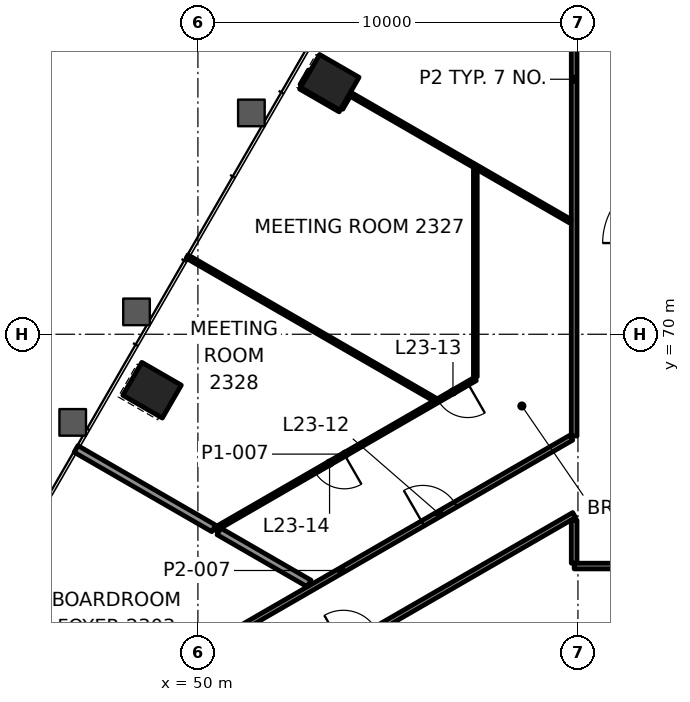
"""IFC4 building model, lengths in metres.
Left out: names, types, materials, properties, quantities, classifications, styles, units other than length and angle.
Written with IfcOpenShell. Run it as: python <this file> out.ifc"""

import sys

from ifc_helpers import new_model, si_unit, direction, frame, frame_2d, origin, origin_2d, place, context, subcontext, project, spatial, rectangle, extrude, element, fill, save


model = new_model("IFC4")
c1 = context("Model", 3, precision=1e-05, world=origin(), true_north=direction((0.0, 1.0)))
c2 = subcontext(c1, "Body", "Model", "MODEL_VIEW")
j1 = project(units=[si_unit("LENGTHUNIT", "METRE"), si_unit("PLANEANGLEUNIT", "RADIAN")], contexts=[c1])
p1 = place(None, origin())
s1 = spatial("IfcSite", under=j1, at=p1, CompositionType="ELEMENT")
p2 = place(p1, origin())
s2 = spatial("IfcBuilding", under=s1, at=p2, CompositionType="ELEMENT")
p3 = place(p2, frame((0.0, 0.0, 103.0)))
s3 = spatial("IfcBuildingStorey", under=s2, at=p3, CompositionType="ELEMENT", Elevation=103.0)
for number, where, z_axis, x_axis in (
    (1, (53.471, 76.628, -0.0), (0.0, 0.0, 1.0), (-0.5, -0.866, 0.0)),
    (2, (48.794, 68.528, -0.0), (0.0, 0.0, 1.0), (-0.5, -0.866, 0.0)),
):
    element("IfcColumn", number, at=place(p3, frame(where, z_axis=z_axis, x_axis=x_axis)), inside=s3, PredefinedType="COLUMN", context=c2, shape_type="SweptSolid", body=[
        extrude(rectangle(XDim=1.0, YDim=1.2, at=origin_2d()), origin(), (0.0, 0.0, 1.0), 4.2),
    ])
p4 = place(p3, frame((90.099, 63.9, 0.0), z_axis=(0.0, 0.0, 1.0), x_axis=(-1.0, 0.0, 0.0)))
e3 = element("IfcWall", 3, at=p4, inside=s3, PredefinedType="PARTITIONING", context=c2, shape_type="SweptSolid", body=[
    extrude(rectangle(XDim=30.199, YDim=0.15, at=frame_2d((15.099, 0.0))), origin(), (0.0, 0.0, 1.0), 3.4),
])
p5 = place(p4, frame((5.882, 0.0, 0.0)))
e4 = element("IfcOpeningElement", 4, at=p5, cuts=e3, PredefinedType="OPENING", context=c2, shape_type="SweptSolid", body=[
    extrude(rectangle(XDim=1.2, YDim=2.1, at=frame_2d((0.6, 1.05))), frame((0.0, 0.085, 0.0), z_axis=(0.0, -1.0, 0.0), x_axis=(1.0, 0.0, 0.0)), (0.0, 0.0, 1.0), 0.17),
])
p6 = place(p4, frame((20.346, 0.0, 0.0)))
e5 = element("IfcOpeningElement", 5, at=p6, cuts=e3, PredefinedType="OPENING", context=c2, shape_type="SweptSolid", body=[
    extrude(rectangle(XDim=1.2, YDim=2.1, at=frame_2d((0.6, 1.05))), frame((0.0, 0.085, 0.0), z_axis=(0.0, -1.0, 0.0), x_axis=(1.0, 0.0, 0.0)), (0.0, 0.0, 1.0), 0.17),
])
p7 = place(p3, frame((48.619, 58.73, 0.0), z_axis=(0.0, 0.0, 1.0), x_axis=(0.866022351388, 0.500005286868, 0.0)))
e6 = element("IfcWall", 6, at=p7, inside=s3, PredefinedType="PARTITIONING", context=c2, shape_type="SweptSolid", body=[
    extrude(rectangle(XDim=13.026, YDim=0.15, at=frame_2d((6.513, 0.0))), origin(), (0.0, 0.0, 1.0), 3.247),
])
p8 = place(p7, frame((6.013, 0.0, 0.0)))
e7 = element("IfcOpeningElement", 7, at=p8, cuts=e6, PredefinedType="OPENING", context=c2, shape_type="SweptSolid", body=[
    extrude(rectangle(XDim=1.0, YDim=2.1, at=frame_2d((0.5, 1.05))), frame((0.0, 0.085, 0.0), z_axis=(0.0, -1.0, 0.0), x_axis=(1.0, 0.0, 0.0)), (0.0, 0.0, 1.0), 0.17),
])
p9 = place(p3, frame((47.719, 60.289, 0.0), z_axis=(0.0, 0.0, 1.0), x_axis=(0.866025916507, 0.499999111938, 0.0)))
e8 = element("IfcWall", 8, at=p9, inside=s3, PredefinedType="PARTITIONING", context=c2, shape_type="SweptSolid", body=[
    extrude(rectangle(XDim=13.979, YDim=0.15, at=frame_2d((6.99, 0.0))), origin(), (0.0, 0.0, 1.0), 3.4),
])
p10 = place(p9, frame((9.467, 0.0, 0.0)))
e9 = element("IfcOpeningElement", 9, at=p10, cuts=e8, PredefinedType="OPENING", context=c2, shape_type="SweptSolid", body=[
    extrude(rectangle(XDim=1.0, YDim=2.1, at=frame_2d((0.5, 1.05))), frame((0.0, 0.085, 0.0), z_axis=(0.0, -1.0, 0.0), x_axis=(1.0, 0.0, 0.0)), (0.0, 0.0, 1.0), 0.17),
])
p11 = place(p3, frame((57.3, 68.823, 0.0), z_axis=(0.0, 0.0, 1.0), x_axis=(-0.866030292833, -0.499991531824, 0.0)))
e10 = element("IfcWall", 10, at=p11, inside=s3, PredefinedType="PARTITIONING", context=c2, shape_type="SweptSolid", body=[
    extrude(rectangle(XDim=7.906, YDim=0.1, at=frame_2d((3.953, 0.0))), origin(), (0.0, 0.0, 1.0), 3.4),
])
p12 = place(p11, frame((0.229, 0.0, 0.0)))
e11 = element("IfcOpeningElement", 11, at=p12, cuts=e10, PredefinedType="OPENING", context=c2, shape_type="SweptSolid", body=[
    extrude(rectangle(XDim=0.9, YDim=2.1, at=frame_2d((0.45, 1.05))), frame((0.0, 0.06, 0.0), z_axis=(0.0, -1.0, 0.0), x_axis=(1.0, 0.0, 0.0)), (0.0, 0.0, 1.0), 0.12),
])
p13 = place(p11, frame((3.979, 0.0, 0.0)))
e12 = element("IfcOpeningElement", 12, at=p13, cuts=e10, PredefinedType="OPENING", context=c2, shape_type="SweptSolid", body=[
    extrude(rectangle(XDim=0.9, YDim=2.1, at=frame_2d((0.45, 1.05))), frame((0.0, 0.06, 0.0), z_axis=(0.0, -1.0, 0.0), x_axis=(1.0, 0.0, 0.0)), (0.0, 0.0, 1.0), 0.12),
])
p14 = place(p3, frame((53.771, 75.948, 0.0), z_axis=(0.0, 0.0, 1.0), x_axis=(0.500246304613, 0.865883153041, 0.0)))
e13 = element("IfcWall", 13, at=p14, inside=s3, PredefinedType="PARTITIONING", context=c2, shape_type="SweptSolid", body=[
    extrude(rectangle(XDim=0.39, YDim=0.1, at=frame_2d((0.195, 0.0))), origin(), (0.0, 0.0, 1.0), 3.4),
])
p15 = place(p3, frame((52.73, 76.545, 0.0), z_axis=(0.0, 0.0, 1.0), x_axis=(0.49999285859, 0.86602952684, 0.0)))
e14 = element("IfcWall", 14, at=p15, inside=s3, PredefinedType="PARTITIONING", context=c2, shape_type="SweptSolid", body=[
    extrude(rectangle(XDim=0.443, YDim=0.1, at=frame_2d((0.221, 0.0))), origin(), (0.0, 0.0, 1.0), 3.4),
])
p16 = place(p3, frame((59.9, 63.976, 0.0), z_axis=(0.0, 0.0, 1.0), x_axis=(0.0, 1.0, 0.0)))
e15 = element("IfcWall", 15, at=p16, inside=s3, PredefinedType="PARTITIONING", context=c2, shape_type="SweptSolid", body=[
    extrude(rectangle(XDim=1.131, YDim=0.15, at=frame_2d((0.565, 0.0))), origin(), (0.0, 0.0, 1.0), 3.247),
])
p17 = place(p3, frame((59.9, 67.321, 0.0), z_axis=(0.0, 0.0, 1.0), x_axis=(0.0, 1.0, 0.0)))
e16 = element("IfcWall", 16, at=p17, inside=s3, PredefinedType="PARTITIONING", context=c2, shape_type="SweptSolid", body=[
    extrude(rectangle(XDim=18.778, YDim=0.15, at=frame_2d((9.389, 0.0))), origin(), (0.0, 0.0, 1.0), 3.4),
])
p18 = place(p3, frame((57.3, 68.88, 0.0), z_axis=(0.0, 0.0, 1.0), x_axis=(0.0, 1.0, 0.0)))
e17 = element("IfcWall", 17, at=p18, inside=s3, PredefinedType="PARTITIONING", context=c2, shape_type="SweptSolid", body=[
    extrude(rectangle(XDim=5.45, YDim=0.1, at=frame_2d((2.725, 0.0))), origin(), (0.0, 0.0, 1.0), 3.4),
])
p19 = place(p3, frame((59.799, 72.975, 0.0), z_axis=(0.0, 0.0, 1.0), x_axis=(-0.866037071789, 0.499979789879, 0.0)))
e18 = element("IfcWall", 18, at=p19, inside=s3, PredefinedType="PARTITIONING", context=c2, shape_type="SweptSolid", body=[
    extrude(rectangle(XDim=6.707, YDim=0.1, at=frame_2d((3.354, 0.0))), origin(), (0.0, 0.0, 1.0), 3.4),
])
p20 = place(p3, frame((53.741, 75.896, 0.0), z_axis=(0.0, 0.0, 1.0), x_axis=(-0.866094119867, 0.499880961361, 0.0)))
e19 = element("IfcWall", 19, at=p20, inside=s3, PredefinedType="PARTITIONING", context=c2, shape_type="SweptSolid", body=[
    extrude(rectangle(XDim=1.2, YDim=0.1, at=frame_2d((0.6, 0.0))), origin(), (0.0, 0.0, 1.0), 3.165),
])
p21 = place(p3, frame((56.223, 68.288, 0.0), z_axis=(0.0, 0.0, 1.0), x_axis=(-0.866018922649, 0.500011225488, 0.0)))
e20 = element("IfcWall", 20, at=p21, inside=s3, PredefinedType="PARTITIONING", context=c2, shape_type="SweptSolid", body=[
    extrude(rectangle(XDim=7.513, YDim=0.1, at=frame_2d((3.757, 0.0))), origin(), (0.0, 0.0, 1.0), 3.165),
])
p22 = place(p3, frame((52.926, 63.441, 0.0), z_axis=(0.0, 0.0, 1.0), x_axis=(-0.866019409031, 0.500010383074, 0.0)))
e21 = element("IfcWall", 21, at=p22, inside=s3, PredefinedType="PARTITIONING", context=c2, shape_type="SweptSolid", body=[
    extrude(rectangle(XDim=2.74, YDim=0.2, at=frame_2d((1.37, 0.0))), origin(), (0.0, 0.0, 1.0), 3.4),
])
p23 = place(p3, frame((50.416, 64.891, 0.0), z_axis=(0.0, 0.0, 1.0), x_axis=(-0.866054366634, 0.499949831517, 0.0)))
e22 = element("IfcWall", 22, at=p23, inside=s3, PredefinedType="PARTITIONING", context=c2, shape_type="SweptSolid", body=[
    extrude(rectangle(XDim=4.183, YDim=0.2, at=frame_2d((2.091, 0.0))), origin(), (0.0, 0.0, 1.0), 3.4),
])
p24 = place(p10, origin())
e23 = element("IfcDoor", 23, at=p24, inside=s3, OperationType="SINGLE_SWING_LEFT", PredefinedType="DOOR", context=c2, shape_type="SweptSolid", body=[
    extrude(rectangle(XDim=1.0, YDim=2.1, at=frame_2d((0.5, 1.05))), frame((0.0, 0.025, 0.0), z_axis=(0.0, -1.0, 0.0), x_axis=(1.0, 0.0, 0.0)), (0.0, 0.0, 1.0), 0.05),
])
fill(e9, e23)
p25 = place(p12, origin())
e24 = element("IfcDoor", 24, at=p25, inside=s3, OperationType="SINGLE_SWING_LEFT", PredefinedType="DOOR", context=c2, shape_type="SweptSolid", body=[
    extrude(rectangle(XDim=0.9, YDim=2.1, at=frame_2d((0.45, 1.05))), frame((0.0, 0.025, 0.0), z_axis=(0.0, -1.0, 0.0), x_axis=(1.0, 0.0, 0.0)), (0.0, 0.0, 1.0), 0.05),
])
fill(e11, e24)
p26 = place(p13, origin())
e25 = element("IfcDoor", 25, at=p26, inside=s3, OperationType="SINGLE_SWING_RIGHT", PredefinedType="DOOR", context=c2, shape_type="SweptSolid", body=[
    extrude(rectangle(XDim=0.9, YDim=2.1, at=frame_2d((0.45, 1.05))), frame((0.0, 0.025, 0.0), z_axis=(0.0, -1.0, 0.0), x_axis=(1.0, 0.0, 0.0)), (0.0, 0.0, 1.0), 0.05),
])
fill(e12, e25)
save(model, sys.argv[1])
